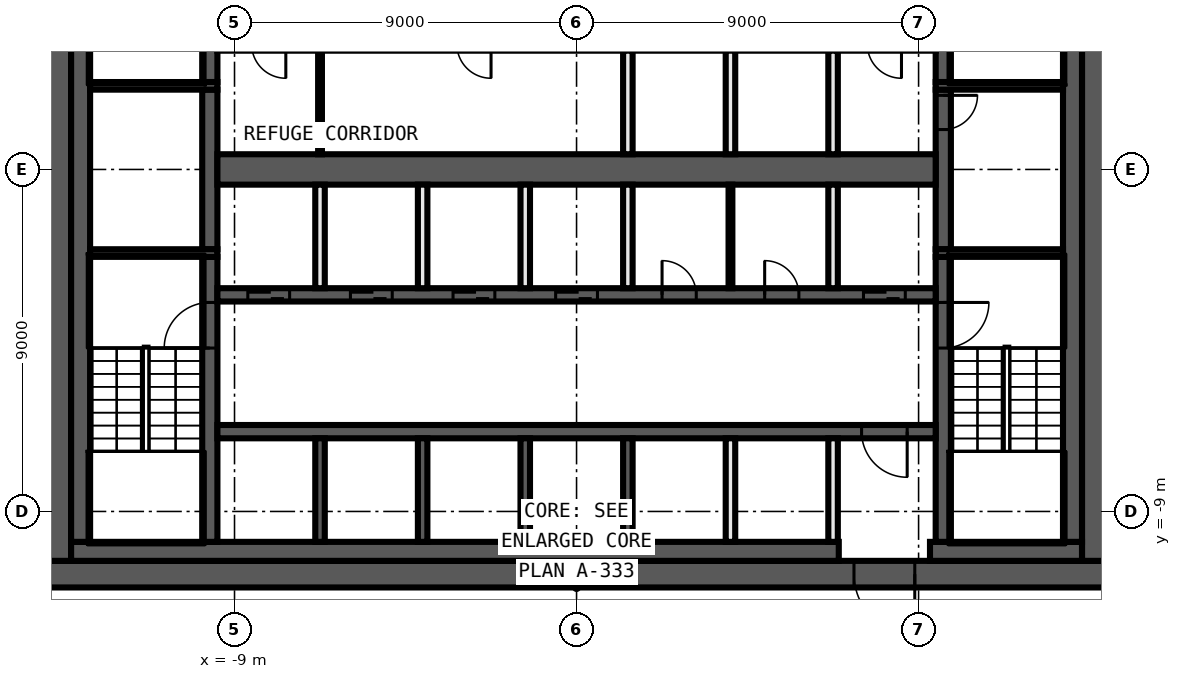
"""IFC4 building model, lengths in metres.
Left out: names, types, materials, properties, quantities, classifications, styles, units other than length and angle.
Written with IfcOpenShell. Run it as: python <this file> out.ifc"""

import sys

from ifc_helpers import new_model, si_unit, direction, frame, frame_2d, origin, place, context, subcontext, project, spatial, rectangle, extrude, element, fill, save


model = new_model("IFC4")
c1 = context("Model", 3, precision=1e-05, world=origin(), true_north=direction((0.0, 1.0)))
c2 = subcontext(c1, "Body", "Model", "MODEL_VIEW")
j1 = project(units=[si_unit("LENGTHUNIT", "METRE"), si_unit("PLANEANGLEUNIT", "RADIAN")], contexts=[c1])
p1 = place(None, origin())
s1 = spatial("IfcSite", under=j1, at=p1, CompositionType="ELEMENT")
p2 = place(p1, origin())
s2 = spatial("IfcBuilding", under=s1, at=p2, CompositionType="ELEMENT")
p3 = place(p2, frame((0.0, 0.0, 283.2)))
s3 = spatial("IfcBuildingStorey", under=s2, at=p3, CompositionType="ELEMENT", Elevation=283.2)
p4 = place(p3, frame((-27.1, -9.409, 0.0), z_axis=(0.0, 0.0, 1.0), x_axis=(0.705769458317, -0.7084415796, 0.0)))
e1 = element("IfcWall", 1, at=p4, inside=s3, PredefinedType="SOLIDWALL", context=c2, shape_type="SweptSolid", body=[
    extrude(rectangle(XDim=20.009, YDim=0.25, at=frame_2d((10.004, 0.0))), origin(), (0.0, 0.0, 1.0), 5.55),
])
p5 = place(p3, frame((14.0, -10.65, 0.0), z_axis=(0.0, 0.0, 1.0), x_axis=(-1.0, 0.0, 0.0)))
e2 = element("IfcWall", 2, at=p5, inside=s3, PredefinedType="SHEAR", context=c2, shape_type="SweptSolid", body=[
    extrude(rectangle(XDim=28.0, YDim=0.7, at=frame_2d((14.0, 0.0))), origin(), (0.0, 0.0, 1.0), 5.55),
])
p6 = place(p5, frame((5.1, 0.0, 0.0)))
e3 = element("IfcOpeningElement", 3, at=p6, cuts=e2, PredefinedType="OPENING", context=c2, shape_type="SweptSolid", body=[
    extrude(rectangle(XDim=1.6, YDim=2.1, at=frame_2d((0.8, 1.05))), frame((0.0, 0.36, 0.0), z_axis=(0.0, -1.0, 0.0), x_axis=(1.0, 0.0, 0.0)), (0.0, 0.0, 1.0), 0.72),
])
for number, where, z_axis, x_axis in (
    (4, (13.65, 10.3, 0.0), (0.0, 0.0, 1.0), (0.0, -1.0, 0.0)),
    (5, (-13.65, -10.3, 0.0), (0.0, 0.0, 1.0), (0.0, 1.0, 0.0)),
):
    element("IfcWall", number, at=place(p3, frame(where, z_axis=z_axis, x_axis=x_axis)), inside=s3, PredefinedType="SHEAR", context=c2, shape_type="SweptSolid", body=[
        extrude(rectangle(XDim=20.6, YDim=0.7, at=frame_2d((10.3, 0.0))), origin(), (0.0, 0.0, 1.0), 5.55),
    ])
p7 = place(p3, frame((13.3, -10.05, 0.0), z_axis=(0.0, 0.0, 1.0), x_axis=(-1.0, 0.0, 0.0)))
e6 = element("IfcWall", 6, at=p7, inside=s3, PredefinedType="SHEAR", context=c2, shape_type="SweptSolid", body=[
    extrude(rectangle(XDim=4.0, YDim=0.5, at=frame_2d((2.0, 0.0))), origin(), (0.0, 0.0, 1.0), 5.55),
])
p8 = place(p3, frame((6.9, -10.05, 0.0), z_axis=(0.0, 0.0, 1.0), x_axis=(-1.0, 0.0, 0.0)))
e7 = element("IfcWall", 7, at=p8, inside=s3, PredefinedType="SHEAR", context=c2, shape_type="SweptSolid", body=[
    extrude(rectangle(XDim=20.2, YDim=0.5, at=frame_2d((10.1, 0.0))), origin(), (0.0, 0.0, 1.0), 5.55),
])
for number, where, z_axis, x_axis in (
    (8, (13.05, 9.8, 0.0), (0.0, 0.0, 1.0), (0.0, -1.0, 0.0)),
    (9, (-13.05, -9.8, 0.0), (0.0, 0.0, 1.0), (0.0, 1.0, 0.0)),
):
    element("IfcWall", number, at=place(p3, frame(where, z_axis=z_axis, x_axis=x_axis)), inside=s3, PredefinedType="SHEAR", context=c2, shape_type="SweptSolid", body=[
        extrude(rectangle(XDim=19.6, YDim=0.5, at=frame_2d((9.8, 0.0))), origin(), (0.0, 0.0, 1.0), 5.55),
    ])
p9 = place(p3, frame((9.65, -2.3, 0.0), z_axis=(0.0, 0.0, 1.0), x_axis=(0.0, -1.0, 0.0)))
e10 = element("IfcWall", 10, at=p9, inside=s3, PredefinedType="SHEAR", context=c2, shape_type="SweptSolid", body=[
    extrude(rectangle(XDim=7.5, YDim=0.4, at=frame_2d((3.75, 0.0))), origin(), (0.0, 0.0, 1.0), 5.55),
])
p10 = place(p9, frame((1.2, 0.0, 0.0)))
e11 = element("IfcOpeningElement", 11, at=p10, cuts=e10, PredefinedType="OPENING", context=c2, shape_type="SweptSolid", body=[
    extrude(rectangle(XDim=1.2, YDim=2.1, at=frame_2d((0.6, 1.05))), frame((0.0, 0.21, 0.0), z_axis=(0.0, -1.0, 0.0), x_axis=(1.0, 0.0, 0.0)), (0.0, 0.0, 1.0), 0.42),
])
p11 = place(p3, frame((9.65, 2.1, 0.0), z_axis=(0.0, 0.0, 1.0), x_axis=(0.0, -1.0, 0.0)))
e12 = element("IfcWall", 12, at=p11, inside=s3, PredefinedType="SHEAR", context=c2, shape_type="SweptSolid", body=[
    extrude(rectangle(XDim=4.2, YDim=0.4, at=frame_2d((2.1, 0.0))), origin(), (0.0, 0.0, 1.0), 5.55),
])
p12 = place(p11, frame((0.15, 0.0, 0.0)))
e13 = element("IfcOpeningElement", 13, at=p12, cuts=e12, PredefinedType="OPENING", context=c2, shape_type="SweptSolid", body=[
    extrude(rectangle(XDim=0.9, YDim=2.1, at=frame_2d((0.45, 1.05))), frame((0.0, 0.21, 0.0), z_axis=(0.0, -1.0, 0.0), x_axis=(1.0, 0.0, 0.0)), (0.0, 0.0, 1.0), 0.42),
])
p13 = place(p3, frame((9.65, 9.8, 0.0), z_axis=(0.0, 0.0, 1.0), x_axis=(0.0, -1.0, 0.0)))
e14 = element("IfcWall", 14, at=p13, inside=s3, PredefinedType="SHEAR", context=c2, shape_type="SweptSolid", body=[
    extrude(rectangle(XDim=7.5, YDim=0.4, at=frame_2d((3.75, 0.0))), origin(), (0.0, 0.0, 1.0), 5.55),
])
p14 = place(p13, frame((5.1, 0.0, 0.0)))
e15 = element("IfcOpeningElement", 15, at=p14, cuts=e14, PredefinedType="OPENING", context=c2, shape_type="SweptSolid", body=[
    extrude(rectangle(XDim=1.2, YDim=2.1, at=frame_2d((0.6, 1.05))), frame((0.0, 0.21, 0.0), z_axis=(0.0, -1.0, 0.0), x_axis=(1.0, 0.0, 0.0)), (0.0, 0.0, 1.0), 0.42),
])
p15 = place(p3, frame((-9.65, -9.8, 0.0), z_axis=(0.0, 0.0, 1.0), x_axis=(0.0, 1.0, 0.0)))
e16 = element("IfcWall", 16, at=p15, inside=s3, PredefinedType="SHEAR", context=c2, shape_type="SweptSolid", body=[
    extrude(rectangle(XDim=7.5, YDim=0.4, at=frame_2d((3.75, 0.0))), origin(), (0.0, 0.0, 1.0), 5.55),
])
p16 = place(p15, frame((5.1, 0.0, 0.0)))
e17 = element("IfcOpeningElement", 17, at=p16, cuts=e16, PredefinedType="OPENING", context=c2, shape_type="SweptSolid", body=[
    extrude(rectangle(XDim=1.2, YDim=2.1, at=frame_2d((0.6, 1.05))), frame((0.0, 0.21, 0.0), z_axis=(0.0, -1.0, 0.0), x_axis=(1.0, 0.0, 0.0)), (0.0, 0.0, 1.0), 0.42),
])
p17 = place(p3, frame((-9.65, -2.1, 0.0), z_axis=(0.0, 0.0, 1.0), x_axis=(0.0, 1.0, 0.0)))
e18 = element("IfcWall", 18, at=p17, inside=s3, PredefinedType="SHEAR", context=c2, shape_type="SweptSolid", body=[
    extrude(rectangle(XDim=4.2, YDim=0.4, at=frame_2d((2.1, 0.0))), origin(), (0.0, 0.0, 1.0), 5.55),
])
p18 = place(p3, frame((-9.65, 2.3, 0.0), z_axis=(0.0, 0.0, 1.0), x_axis=(0.0, 1.0, 0.0)))
e19 = element("IfcWall", 19, at=p18, inside=s3, PredefinedType="SHEAR", context=c2, shape_type="SweptSolid", body=[
    extrude(rectangle(XDim=7.5, YDim=0.4, at=frame_2d((3.75, 0.0))), origin(), (0.0, 0.0, 1.0), 5.55),
])
p19 = place(p18, frame((1.2, 0.0, 0.0)))
e20 = element("IfcOpeningElement", 20, at=p19, cuts=e19, PredefinedType="OPENING", context=c2, shape_type="SweptSolid", body=[
    extrude(rectangle(XDim=1.2, YDim=2.1, at=frame_2d((0.6, 1.05))), frame((0.0, 0.21, 0.0), z_axis=(0.0, -1.0, 0.0), x_axis=(1.0, 0.0, 0.0)), (0.0, 0.0, 1.0), 0.42),
])
for number, where, z_axis, x_axis in (
    (21, (9.45, 2.2, 0.0), (0.0, 0.0, 1.0), (1.0, 0.0, 0.0)),
    (22, (-9.45, 2.2, 0.0), (0.0, 0.0, 1.0), (-1.0, 0.0, 0.0)),
    (23, (9.45, -2.2, 0.0), (0.0, 0.0, 1.0), (1.0, 0.0, 0.0)),
    (24, (-9.45, -2.2, 0.0), (0.0, 0.0, 1.0), (-1.0, 0.0, 0.0)),
):
    element("IfcWall", number, at=place(p3, frame(where, z_axis=z_axis, x_axis=x_axis)), inside=s3, PredefinedType="SHEAR", context=c2, shape_type="SweptSolid", body=[
        extrude(rectangle(XDim=3.35, YDim=0.2, at=frame_2d((1.675, 0.0))), origin(), (0.0, 0.0, 1.0), 5.55),
    ])
p20 = place(p3, frame((-9.45, -3.3, 0.0), z_axis=(0.0, 0.0, 1.0), x_axis=(1.0, 0.0, 0.0)))
e25 = element("IfcWall", 25, at=p20, inside=s3, PredefinedType="SHEAR", context=c2, shape_type="SweptSolid", body=[
    extrude(rectangle(XDim=18.9, YDim=0.35, at=frame_2d((9.45, 0.0))), origin(), (0.0, 0.0, 1.0), 5.55),
])
p21 = place(p20, frame((0.8, 0.0, 0.0)))
e26 = element("IfcOpeningElement", 26, at=p21, cuts=e25, PredefinedType="OPENING", context=c2, shape_type="SweptSolid", body=[
    extrude(rectangle(XDim=1.1, YDim=2.1, at=frame_2d((0.55, 1.05))), frame((0.0, 0.185, 0.0), z_axis=(0.0, -1.0, 0.0), x_axis=(1.0, 0.0, 0.0)), (0.0, 0.0, 1.0), 0.37),
])
p22 = place(p20, frame((3.5, 0.0, 0.0)))
e27 = element("IfcOpeningElement", 27, at=p22, cuts=e25, PredefinedType="OPENING", context=c2, shape_type="SweptSolid", body=[
    extrude(rectangle(XDim=1.1, YDim=2.1, at=frame_2d((0.55, 1.05))), frame((0.0, 0.185, 0.0), z_axis=(0.0, -1.0, 0.0), x_axis=(1.0, 0.0, 0.0)), (0.0, 0.0, 1.0), 0.37),
])
p23 = place(p20, frame((6.2, 0.0, 0.0)))
e28 = element("IfcOpeningElement", 28, at=p23, cuts=e25, PredefinedType="OPENING", context=c2, shape_type="SweptSolid", body=[
    extrude(rectangle(XDim=1.1, YDim=2.1, at=frame_2d((0.55, 1.05))), frame((0.0, 0.185, 0.0), z_axis=(0.0, -1.0, 0.0), x_axis=(1.0, 0.0, 0.0)), (0.0, 0.0, 1.0), 0.37),
])
p24 = place(p20, frame((8.9, 0.0, 0.0)))
e29 = element("IfcOpeningElement", 29, at=p24, cuts=e25, PredefinedType="OPENING", context=c2, shape_type="SweptSolid", body=[
    extrude(rectangle(XDim=1.1, YDim=2.1, at=frame_2d((0.55, 1.05))), frame((0.0, 0.185, 0.0), z_axis=(0.0, -1.0, 0.0), x_axis=(1.0, 0.0, 0.0)), (0.0, 0.0, 1.0), 0.37),
])
p25 = place(p20, frame((17.0, 0.0, 0.0)))
e30 = element("IfcOpeningElement", 30, at=p25, cuts=e25, PredefinedType="OPENING", context=c2, shape_type="SweptSolid", body=[
    extrude(rectangle(XDim=1.1, YDim=2.1, at=frame_2d((0.55, 1.05))), frame((0.0, 0.185, 0.0), z_axis=(0.0, -1.0, 0.0), x_axis=(1.0, 0.0, 0.0)), (0.0, 0.0, 1.0), 0.37),
])
p26 = place(p20, frame((11.7, 0.0, 0.0)))
e31 = element("IfcOpeningElement", 31, at=p26, cuts=e25, PredefinedType="OPENING", context=c2, shape_type="SweptSolid", body=[
    extrude(rectangle(XDim=0.9, YDim=2.1, at=frame_2d((0.45, 1.05))), frame((0.0, 0.185, 0.0), z_axis=(0.0, -1.0, 0.0), x_axis=(1.0, 0.0, 0.0)), (0.0, 0.0, 1.0), 0.37),
])
p27 = place(p20, frame((14.4, 0.0, 0.0)))
e32 = element("IfcOpeningElement", 32, at=p27, cuts=e25, PredefinedType="OPENING", context=c2, shape_type="SweptSolid", body=[
    extrude(rectangle(XDim=0.9, YDim=2.1, at=frame_2d((0.45, 1.05))), frame((0.0, 0.185, 0.0), z_axis=(0.0, -1.0, 0.0), x_axis=(1.0, 0.0, 0.0)), (0.0, 0.0, 1.0), 0.37),
])
p28 = place(p3, frame((9.45, -6.9, 0.0), z_axis=(0.0, 0.0, 1.0), x_axis=(-1.0, 0.0, 0.0)))
e33 = element("IfcWall", 33, at=p28, inside=s3, PredefinedType="SHEAR", context=c2, shape_type="SweptSolid", body=[
    extrude(rectangle(XDim=18.9, YDim=0.35, at=frame_2d((9.45, 0.0))), origin(), (0.0, 0.0, 1.0), 5.55),
])
p29 = place(p28, frame((0.75, 0.0, 0.0)))
e34 = element("IfcOpeningElement", 34, at=p29, cuts=e33, PredefinedType="OPENING", context=c2, shape_type="SweptSolid", body=[
    extrude(rectangle(XDim=1.2, YDim=2.1, at=frame_2d((0.6, 1.05))), frame((0.0, 0.185, 0.0), z_axis=(0.0, -1.0, 0.0), x_axis=(1.0, 0.0, 0.0)), (0.0, 0.0, 1.0), 0.37),
])
p30 = place(p3, frame((-9.45, 0.0, 0.0), z_axis=(0.0, 0.0, 1.0), x_axis=(1.0, 0.0, 0.0)))
e35 = element("IfcWall", 35, at=p30, inside=s3, PredefinedType="SHEAR", context=c2, shape_type="SweptSolid", body=[
    extrude(rectangle(XDim=18.9, YDim=0.8, at=frame_2d((9.45, 0.0))), origin(), (0.0, 0.0, 1.0), 5.55),
])
for number, where, z_axis, x_axis in (
    (36, (6.75, -9.8, 0.0), (0.0, 0.0, 1.0), (0.0, 1.0, 0.0)),
    (37, (6.75, -3.125, 0.0), (0.0, 0.0, 1.0), (0.0, 1.0, 0.0)),
    (38, (6.75, 0.4, 0.0), (0.0, 0.0, 1.0), (0.0, 1.0, 0.0)),
):
    element("IfcWall", number, at=place(p3, frame(where, z_axis=z_axis, x_axis=x_axis)), inside=s3, PredefinedType="SOLIDWALL", context=c2, shape_type="SweptSolid", body=[
        extrude(rectangle(XDim=2.725, YDim=0.25, at=frame_2d((1.363, 0.0))), origin(), (0.0, 0.0, 1.0), 5.55),
    ])
p31 = place(p3, frame((4.05, -3.125, 0.0), z_axis=(0.0, 0.0, 1.0), x_axis=(0.0, 1.0, 0.0)))
e39 = element("IfcWall", 39, at=p31, inside=s3, PredefinedType="PARTITIONING", context=c2, shape_type="SweptSolid", body=[
    extrude(rectangle(XDim=2.725, YDim=0.1, at=frame_2d((1.363, 0.0))), origin(), (0.0, 0.0, 1.0), 5.55),
])
for number, where, z_axis, x_axis in (
    (40, (4.05, -9.8, 0.0), (0.0, 0.0, 1.0), (0.0, 1.0, 0.0)),
    (41, (4.05, 0.4, 0.0), (0.0, 0.0, 1.0), (0.0, 1.0, 0.0)),
):
    element("IfcWall", number, at=place(p3, frame(where, z_axis=z_axis, x_axis=x_axis)), inside=s3, PredefinedType="SOLIDWALL", context=c2, shape_type="SweptSolid", body=[
        extrude(rectangle(XDim=2.725, YDim=0.25, at=frame_2d((1.363, 0.0))), origin(), (0.0, 0.0, 1.0), 5.55),
    ])
p32 = place(p3, frame((1.35, -9.8, 0.0), z_axis=(0.0, 0.0, 1.0), x_axis=(0.0, 1.0, 0.0)))
e42 = element("IfcWall", 42, at=p32, inside=s3, PredefinedType="SHEAR", context=c2, shape_type="SweptSolid", body=[
    extrude(rectangle(XDim=2.725, YDim=0.25, at=frame_2d((1.363, 0.0))), origin(), (0.0, 0.0, 1.0), 5.55),
])
for number, where, z_axis, x_axis in (
    (43, (1.35, -3.125, 0.0), (0.0, 0.0, 1.0), (0.0, 1.0, 0.0)),
    (44, (1.35, 0.4, 0.0), (0.0, 0.0, 1.0), (0.0, 1.0, 0.0)),
):
    element("IfcWall", number, at=place(p3, frame(where, z_axis=z_axis, x_axis=x_axis)), inside=s3, PredefinedType="SOLIDWALL", context=c2, shape_type="SweptSolid", body=[
        extrude(rectangle(XDim=2.725, YDim=0.25, at=frame_2d((1.363, 0.0))), origin(), (0.0, 0.0, 1.0), 5.55),
    ])
p33 = place(p3, frame((-1.35, -9.8, 0.0), z_axis=(0.0, 0.0, 1.0), x_axis=(0.0, 1.0, 0.0)))
e45 = element("IfcWall", 45, at=p33, inside=s3, PredefinedType="SHEAR", context=c2, shape_type="SweptSolid", body=[
    extrude(rectangle(XDim=2.725, YDim=0.25, at=frame_2d((1.363, 0.0))), origin(), (0.0, 0.0, 1.0), 5.55),
])
p34 = place(p3, frame((-1.35, -3.125, 0.0), z_axis=(0.0, 0.0, 1.0), x_axis=(0.0, 1.0, 0.0)))
e46 = element("IfcWall", 46, at=p34, inside=s3, PredefinedType="SOLIDWALL", context=c2, shape_type="SweptSolid", body=[
    extrude(rectangle(XDim=2.725, YDim=0.25, at=frame_2d((1.363, 0.0))), origin(), (0.0, 0.0, 1.0), 5.55),
])
p35 = place(p3, frame((-4.05, -9.8, 0.0), z_axis=(0.0, 0.0, 1.0), x_axis=(0.0, 1.0, 0.0)))
e47 = element("IfcWall", 47, at=p35, inside=s3, PredefinedType="SHEAR", context=c2, shape_type="SweptSolid", body=[
    extrude(rectangle(XDim=2.725, YDim=0.25, at=frame_2d((1.363, 0.0))), origin(), (0.0, 0.0, 1.0), 5.55),
])
p36 = place(p3, frame((-4.05, -3.125, 0.0), z_axis=(0.0, 0.0, 1.0), x_axis=(0.0, 1.0, 0.0)))
e48 = element("IfcWall", 48, at=p36, inside=s3, PredefinedType="SOLIDWALL", context=c2, shape_type="SweptSolid", body=[
    extrude(rectangle(XDim=2.725, YDim=0.25, at=frame_2d((1.363, 0.0))), origin(), (0.0, 0.0, 1.0), 5.55),
])
p37 = place(p3, frame((-6.75, 0.4, 0.0), z_axis=(0.0, 0.0, 1.0), x_axis=(0.0, 1.0, 0.0)))
e49 = element("IfcWall", 49, at=p37, inside=s3, PredefinedType="PARTITIONING", context=c2, shape_type="SweptSolid", body=[
    extrude(rectangle(XDim=2.725, YDim=0.1, at=frame_2d((1.363, 0.0))), origin(), (0.0, 0.0, 1.0), 5.55),
])
p38 = place(p3, frame((-6.75, -9.8, 0.0), z_axis=(0.0, 0.0, 1.0), x_axis=(0.0, 1.0, 0.0)))
e50 = element("IfcWall", 50, at=p38, inside=s3, PredefinedType="SHEAR", context=c2, shape_type="SweptSolid", body=[
    extrude(rectangle(XDim=2.725, YDim=0.25, at=frame_2d((1.363, 0.0))), origin(), (0.0, 0.0, 1.0), 5.55),
])
p39 = place(p3, frame((-6.75, -3.125, 0.0), z_axis=(0.0, 0.0, 1.0), x_axis=(0.0, 1.0, 0.0)))
e51 = element("IfcWall", 51, at=p39, inside=s3, PredefinedType="SOLIDWALL", context=c2, shape_type="SweptSolid", body=[
    extrude(rectangle(XDim=2.725, YDim=0.25, at=frame_2d((1.363, 0.0))), origin(), (0.0, 0.0, 1.0), 5.55),
])
p40 = place(p12, origin())
e52 = element("IfcDoor", 52, at=p40, inside=s3, OperationType="SINGLE_SWING_RIGHT", PredefinedType="DOOR", context=c2, shape_type="SweptSolid", body=[
    extrude(rectangle(XDim=0.9, YDim=2.1, at=frame_2d((0.45, 1.05))), frame((0.0, 0.025, 0.0), z_axis=(0.0, -1.0, 0.0), x_axis=(1.0, 0.0, 0.0)), (0.0, 0.0, 1.0), 0.05),
])
fill(e13, e52)
p41 = place(p21, origin())
e53 = element("IfcDoor", 53, at=p41, inside=s3, OperationType="DOUBLE_DOOR_SLIDING", PredefinedType="DOOR", context=c2, shape_type="SweptSolid", body=[
    extrude(rectangle(XDim=1.1, YDim=2.1, at=frame_2d((0.55, 1.05))), frame((0.0, 0.025, 0.0), z_axis=(0.0, -1.0, 0.0), x_axis=(1.0, 0.0, 0.0)), (0.0, 0.0, 1.0), 0.05),
])
fill(e26, e53)
p42 = place(p22, origin())
e54 = element("IfcDoor", 54, at=p42, inside=s3, OperationType="DOUBLE_DOOR_SLIDING", PredefinedType="DOOR", context=c2, shape_type="SweptSolid", body=[
    extrude(rectangle(XDim=1.1, YDim=2.1, at=frame_2d((0.55, 1.05))), frame((0.0, 0.025, 0.0), z_axis=(0.0, -1.0, 0.0), x_axis=(1.0, 0.0, 0.0)), (0.0, 0.0, 1.0), 0.05),
])
fill(e27, e54)
p43 = place(p23, origin())
e55 = element("IfcDoor", 55, at=p43, inside=s3, OperationType="DOUBLE_DOOR_SLIDING", PredefinedType="DOOR", context=c2, shape_type="SweptSolid", body=[
    extrude(rectangle(XDim=1.1, YDim=2.1, at=frame_2d((0.55, 1.05))), frame((0.0, 0.025, 0.0), z_axis=(0.0, -1.0, 0.0), x_axis=(1.0, 0.0, 0.0)), (0.0, 0.0, 1.0), 0.05),
])
fill(e28, e55)
p44 = place(p24, origin())
e56 = element("IfcDoor", 56, at=p44, inside=s3, OperationType="DOUBLE_DOOR_SLIDING", PredefinedType="DOOR", context=c2, shape_type="SweptSolid", body=[
    extrude(rectangle(XDim=1.1, YDim=2.1, at=frame_2d((0.55, 1.05))), frame((0.0, 0.025, 0.0), z_axis=(0.0, -1.0, 0.0), x_axis=(1.0, 0.0, 0.0)), (0.0, 0.0, 1.0), 0.05),
])
fill(e29, e56)
p45 = place(p25, origin())
e57 = element("IfcDoor", 57, at=p45, inside=s3, OperationType="DOUBLE_DOOR_SLIDING", PredefinedType="DOOR", context=c2, shape_type="SweptSolid", body=[
    extrude(rectangle(XDim=1.1, YDim=2.1, at=frame_2d((0.55, 1.05))), frame((0.0, 0.025, 0.0), z_axis=(0.0, -1.0, 0.0), x_axis=(1.0, 0.0, 0.0)), (0.0, 0.0, 1.0), 0.05),
])
fill(e30, e57)
p46 = place(p6, origin())
e58 = element("IfcDoor", 58, at=p46, inside=s3, OperationType="DOUBLE_DOOR_SINGLE_SWING", PredefinedType="DOOR", context=c2, shape_type="SweptSolid", body=[
    extrude(rectangle(XDim=1.6, YDim=2.1, at=frame_2d((0.8, 1.05))), frame((0.0, 0.025, 0.0), z_axis=(0.0, -1.0, 0.0), x_axis=(1.0, 0.0, 0.0)), (0.0, 0.0, 1.0), 0.05),
])
fill(e3, e58)
p47 = place(p29, origin())
e59 = element("IfcDoor", 59, at=p47, inside=s3, OperationType="SINGLE_SWING_LEFT", PredefinedType="DOOR", context=c2, shape_type="SweptSolid", body=[
    extrude(rectangle(XDim=1.2, YDim=2.1, at=frame_2d((0.6, 1.05))), frame((0.0, 0.025, 0.0), z_axis=(0.0, -1.0, 0.0), x_axis=(1.0, 0.0, 0.0)), (0.0, 0.0, 1.0), 0.05),
])
fill(e34, e59)
p48 = place(p26, origin())
e60 = element("IfcDoor", 60, at=p48, inside=s3, OperationType="SINGLE_SWING_RIGHT", PredefinedType="DOOR", context=c2, shape_type="SweptSolid", body=[
    extrude(rectangle(XDim=0.9, YDim=2.1, at=frame_2d((0.45, 1.05))), frame((0.0, 0.025, 0.0), z_axis=(0.0, -1.0, 0.0), x_axis=(1.0, 0.0, 0.0)), (0.0, 0.0, 1.0), 0.05),
])
fill(e31, e60)
p49 = place(p27, origin())
e61 = element("IfcDoor", 61, at=p49, inside=s3, OperationType="SINGLE_SWING_LEFT", PredefinedType="DOOR", context=c2, shape_type="SweptSolid", body=[
    extrude(rectangle(XDim=0.9, YDim=2.1, at=frame_2d((0.45, 1.05))), frame((0.0, 0.025, 0.0), z_axis=(0.0, -1.0, 0.0), x_axis=(1.0, 0.0, 0.0)), (0.0, 0.0, 1.0), 0.05),
])
fill(e32, e61)
p50 = place(p10, origin())
e62 = element("IfcDoor", 62, at=p50, inside=s3, OperationType="SINGLE_SWING_RIGHT", PredefinedType="DOOR", context=c2, shape_type="SweptSolid", body=[
    extrude(rectangle(XDim=1.2, YDim=2.1, at=frame_2d((0.6, 1.05))), frame((0.0, 0.025, 0.0), z_axis=(0.0, -1.0, 0.0), x_axis=(1.0, 0.0, 0.0)), (0.0, 0.0, 1.0), 0.05),
])
fill(e11, e62)
p51 = place(p16, origin())
e63 = element("IfcDoor", 63, at=p51, inside=s3, OperationType="SINGLE_SWING_LEFT", PredefinedType="DOOR", context=c2, shape_type="SweptSolid", body=[
    extrude(rectangle(XDim=1.2, YDim=2.1, at=frame_2d((0.6, 1.05))), frame((0.0, 0.025, 0.0), z_axis=(0.0, -1.0, 0.0), x_axis=(1.0, 0.0, 0.0)), (0.0, 0.0, 1.0), 0.05),
])
fill(e17, e63)
save(model, sys.argv[1])
